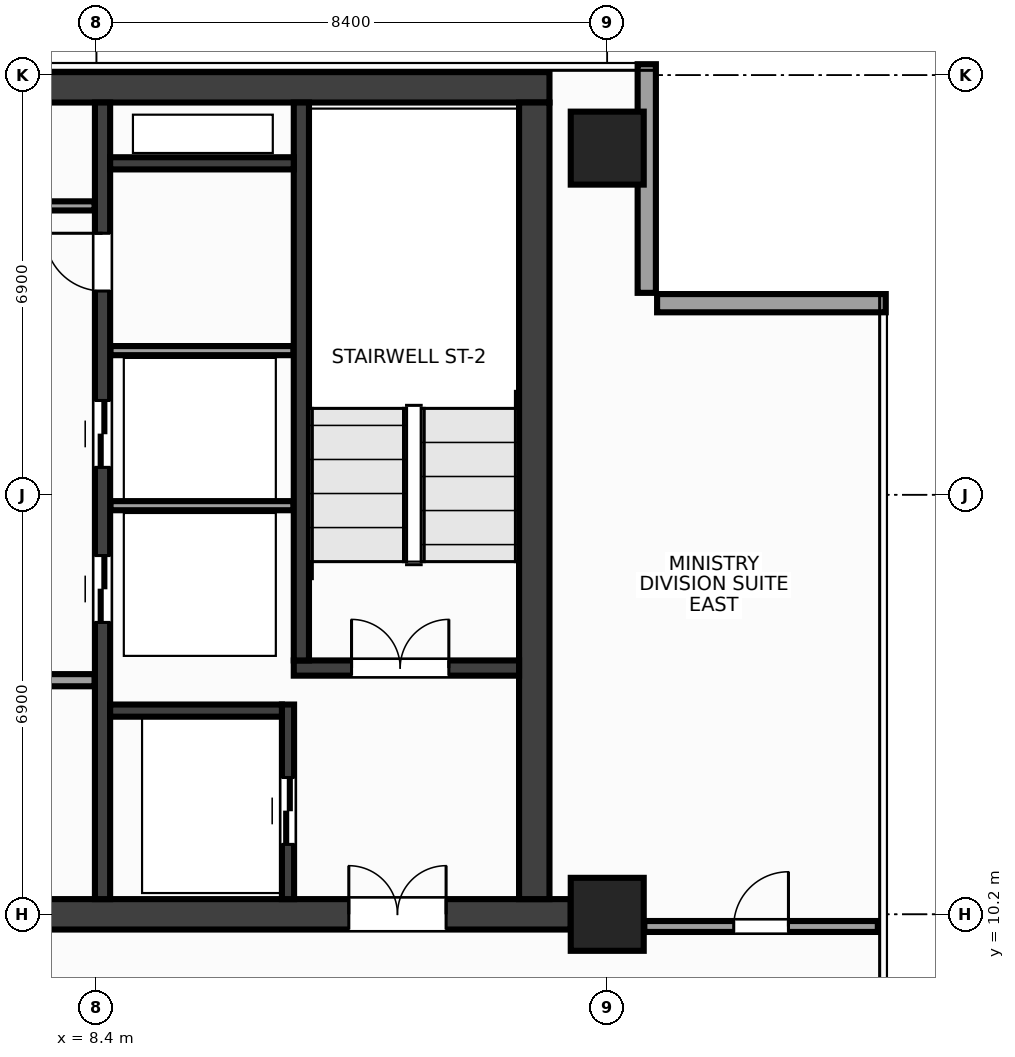
"""IFC4 building model, lengths in metres.
Left out: names, types, materials, properties, quantities, classifications, styles, units other than length and angle.
Written with IfcOpenShell. Run it as: python <this file> out.ifc"""

import sys

from ifc_helpers import new_model, si_unit, direction, frame, frame_2d, origin, origin_2d, place, context, subcontext, project, spatial, rectangle, extrude, source, transform, mapped, element, fill, save


model = new_model("IFC4")
c1 = context("Model", 3, precision=1e-05, world=origin(), true_north=direction((0.0, 1.0)))
c2 = subcontext(c1, "Body", "Model", "MODEL_VIEW")
j1 = project(units=[si_unit("LENGTHUNIT", "METRE"), si_unit("PLANEANGLEUNIT", "RADIAN")], contexts=[c1])
p1 = place(None, origin())
s1 = spatial("IfcSite", under=j1, at=p1, CompositionType="ELEMENT")
p2 = place(p1, origin())
s2 = spatial("IfcBuilding", under=s1, at=p2, CompositionType="ELEMENT")
p3 = place(p2, frame((0.0, 0.0, 290.0)))
s3 = spatial("IfcBuildingStorey", under=s2, at=p3, CompositionType="ELEMENT", Elevation=290.0)
m1 = source(origin(), c2, "Body", "SweptSolid", [
    extrude(rectangle(XDim=31.7, YDim=0.5, at=frame_2d((15.85, 0.0))), origin(), (0.0, 0.0, 1.0), 3.6),
])
p4 = place(p3, frame((-15.85, 23.8, 0.0), z_axis=(0.0, 0.0, 1.0), x_axis=(1.0, 0.0, 0.0)))
e1 = element("IfcWall", 1, at=p4, inside=s3, PredefinedType="SHEAR", context=c2, shape_type="MappedRepresentation", body=[
    mapped(m1, transform((0.0, 0.0, 0.0), x_axis=(1.0, 0.0, 0.0), y_axis=(0.0, 1.0, 0.0), z_axis=(0.0, 0.0, 1.0), scale=1.0)),
])
m2 = source(origin(), c2, "Body", "SweptSolid", [
    extrude(rectangle(XDim=32.4, YDim=0.5, at=frame_2d((16.2, 0.0))), origin(), (0.0, 0.0, 1.0), 3.6),
])
p5 = place(p3, frame((-16.2, 10.2, 0.0), z_axis=(0.0, 0.0, 1.0), x_axis=(1.0, 0.0, 0.0)))
e2 = element("IfcWall", 2, at=p5, inside=s3, PredefinedType="SHEAR", context=c2, shape_type="MappedRepresentation", body=[
    mapped(m2, transform((0.0, 0.0, 0.0), x_axis=(1.0, 0.0, 0.0), y_axis=(0.0, 1.0, 0.0), z_axis=(0.0, 0.0, 1.0), scale=1.0)),
])
p6 = place(p5, frame((2.05, 0.0, 0.0)))
e3 = element("IfcOpeningElement", 3, at=p6, cuts=e2, PredefinedType="OPENING", context=c2, shape_type="SweptSolid", body=[
    extrude(rectangle(XDim=1.6, YDim=2.15, at=frame_2d((0.8, 1.075))), frame((0.0, 0.262, 0.0), z_axis=(0.0, -1.0, 0.0), x_axis=(1.0, 0.0, 0.0)), (0.0, 0.0, 1.0), 0.524),
])
p7 = place(p5, frame((28.75, 0.0, 0.0)))
e4 = element("IfcOpeningElement", 4, at=p7, cuts=e2, PredefinedType="OPENING", context=c2, shape_type="SweptSolid", body=[
    extrude(rectangle(XDim=1.6, YDim=2.15, at=frame_2d((0.8, 1.075))), frame((0.0, 0.262, 0.0), z_axis=(0.0, -1.0, 0.0), x_axis=(1.0, 0.0, 0.0)), (0.0, 0.0, 1.0), 0.524),
])
p8 = place(p5, frame((15.45, 0.0, 0.0)))
e5 = element("IfcOpeningElement", 5, at=p8, cuts=e2, PredefinedType="OPENING", context=c2, shape_type="SweptSolid", body=[
    extrude(rectangle(XDim=1.5, YDim=2.2, at=frame_2d((0.75, 1.1))), frame((0.0, 0.262, 0.0), z_axis=(0.0, -1.0, 0.0), x_axis=(1.0, 0.0, 0.0)), (0.0, 0.0, 1.0), 0.524),
])
m3 = source(origin(), c2, "Body", "SweptSolid", [
    extrude(rectangle(XDim=13.1, YDim=0.5, at=frame_2d((6.55, 0.0))), origin(), (0.0, 0.0, 1.0), 3.6),
])
p9 = place(p3, frame((15.6, 10.45, 0.0), z_axis=(0.0, 0.0, 1.0), x_axis=(0.0, 1.0, 0.0)))
e6 = element("IfcWall", 6, at=p9, inside=s3, PredefinedType="SHEAR", context=c2, shape_type="MappedRepresentation", body=[
    mapped(m3, transform((0.0, 0.0, 0.0), x_axis=(1.0, 0.0, 0.0), y_axis=(0.0, 1.0, 0.0), z_axis=(0.0, 0.0, 1.0), scale=1.0)),
])
m4 = source(origin(), c2, "Body", "SweptSolid", [
    extrude(rectangle(XDim=13.1, YDim=0.25, at=frame_2d((6.55, 0.0))), origin(), (0.0, 0.0, 1.0), 3.6),
])
p10 = place(p3, frame((8.5, 10.45, 0.0), z_axis=(0.0, 0.0, 1.0), x_axis=(0.0, 1.0, 0.0)))
e7 = element("IfcWall", 7, at=p10, inside=s3, PredefinedType="SHEAR", context=c2, shape_type="MappedRepresentation", body=[
    mapped(m4, transform((0.0, 0.0, 0.0), x_axis=(1.0, 0.0, 0.0), y_axis=(0.0, 1.0, 0.0), z_axis=(0.0, 0.0, 1.0), scale=1.0)),
])
p11 = place(p10, frame((4.55, 0.0, 0.0)))
e8 = element("IfcOpeningElement", 8, at=p11, cuts=e7, PredefinedType="OPENING", context=c2, shape_type="SweptSolid", body=[
    extrude(rectangle(XDim=1.1, YDim=2.15, at=frame_2d((0.55, 1.075))), frame((0.0, 0.137, 0.0), z_axis=(0.0, -1.0, 0.0), x_axis=(1.0, 0.0, 0.0)), (0.0, 0.0, 1.0), 0.274),
])
p12 = place(p10, frame((7.1, 0.0, 0.0)))
e9 = element("IfcOpeningElement", 9, at=p12, cuts=e7, PredefinedType="OPENING", context=c2, shape_type="SweptSolid", body=[
    extrude(rectangle(XDim=1.1, YDim=2.15, at=frame_2d((0.55, 1.075))), frame((0.0, 0.137, 0.0), z_axis=(0.0, -1.0, 0.0), x_axis=(1.0, 0.0, 0.0)), (0.0, 0.0, 1.0), 0.274),
])
p13 = place(p10, frame((10.0, 0.0, 0.0)))
e10 = element("IfcOpeningElement", 10, at=p13, cuts=e7, PredefinedType="OPENING", context=c2, shape_type="SweptSolid", body=[
    extrude(rectangle(XDim=0.95, YDim=2.15, at=frame_2d((0.475, 1.075))), frame((0.0, 0.137, 0.0), z_axis=(0.0, -1.0, 0.0), x_axis=(1.0, 0.0, 0.0)), (0.0, 0.0, 1.0), 0.274),
])
m5 = source(origin(), c2, "Body", "SweptSolid", [
    extrude(rectangle(XDim=3.705, YDim=0.25, at=frame_2d((1.853, 0.0))), origin(), (0.0, 0.0, 1.0), 3.6),
])
p14 = place(p3, frame((11.645, 14.25, 0.0), z_axis=(0.0, 0.0, 1.0), x_axis=(1.0, 0.0, 0.0)))
e11 = element("IfcWall", 11, at=p14, inside=s3, PredefinedType="SHEAR", context=c2, shape_type="MappedRepresentation", body=[
    mapped(m5, transform((0.0, 0.0, 0.0), x_axis=(1.0, 0.0, 0.0), y_axis=(0.0, 1.0, 0.0), z_axis=(0.0, 0.0, 1.0), scale=1.0)),
])
p15 = place(p14, frame((0.95, 0.0, 0.0)))
e12 = element("IfcOpeningElement", 12, at=p15, cuts=e11, PredefinedType="OPENING", context=c2, shape_type="SweptSolid", body=[
    extrude(rectangle(XDim=1.6, YDim=2.15, at=frame_2d((0.8, 1.075))), frame((0.0, 0.137, 0.0), z_axis=(0.0, -1.0, 0.0), x_axis=(1.0, 0.0, 0.0)), (0.0, 0.0, 1.0), 0.274),
])
m6 = source(origin(), c2, "Body", "SweptSolid", [
    extrude(rectangle(XDim=9.175, YDim=0.25, at=frame_2d((4.587, 0.0))), origin(), (0.0, 0.0, 1.0), 3.6),
])
p16 = place(p3, frame((11.77, 14.375, 0.0), z_axis=(0.0, 0.0, 1.0), x_axis=(0.0, 1.0, 0.0)))
e13 = element("IfcWall", 13, at=p16, inside=s3, PredefinedType="SHEAR", context=c2, shape_type="MappedRepresentation", body=[
    mapped(m6, transform((0.0, 0.0, 0.0), x_axis=(1.0, 0.0, 0.0), y_axis=(0.0, 1.0, 0.0), z_axis=(0.0, 0.0, 1.0), scale=1.0)),
])
m7 = source(origin(), c2, "Body", "SweptSolid", [
    extrude(rectangle(XDim=3.2, YDim=0.2, at=frame_2d((1.6, 0.0))), origin(), (0.0, 0.0, 1.0), 3.6),
])
p17 = place(p3, frame((11.55, 10.45, 0.0), z_axis=(0.0, 0.0, 1.0), x_axis=(0.0, 1.0, 0.0)))
e14 = element("IfcWall", 14, at=p17, inside=s3, PredefinedType="SHEAR", context=c2, shape_type="MappedRepresentation", body=[
    mapped(m7, transform((0.0, 0.0, 0.0), x_axis=(1.0, 0.0, 0.0), y_axis=(0.0, 1.0, 0.0), z_axis=(0.0, 0.0, 1.0), scale=1.0)),
])
p18 = place(p17, frame((0.9, 0.0, 0.0)))
e15 = element("IfcOpeningElement", 15, at=p18, cuts=e14, PredefinedType="OPENING", context=c2, shape_type="SweptSolid", body=[
    extrude(rectangle(XDim=1.1, YDim=2.15, at=frame_2d((0.55, 1.075))), frame((0.0, 0.112, 0.0), z_axis=(0.0, -1.0, 0.0), x_axis=(1.0, 0.0, 0.0)), (0.0, 0.0, 1.0), 0.224),
])
m8 = source(origin(), c2, "Body", "SweptSolid", [
    extrude(rectangle(XDim=2.825, YDim=0.2, at=frame_2d((1.413, 0.0))), origin(), (0.0, 0.0, 1.0), 3.6),
])
p19 = place(p3, frame((8.625, 13.55, 0.0), z_axis=(0.0, 0.0, 1.0), x_axis=(1.0, 0.0, 0.0)))
e16 = element("IfcWall", 16, at=p19, inside=s3, PredefinedType="SHEAR", context=c2, shape_type="MappedRepresentation", body=[
    mapped(m8, transform((0.0, 0.0, 0.0), x_axis=(1.0, 0.0, 0.0), y_axis=(0.0, 1.0, 0.0), z_axis=(0.0, 0.0, 1.0), scale=1.0)),
])
m9 = source(origin(), c2, "Body", "SweptSolid", [
    extrude(rectangle(XDim=3.02, YDim=0.2, at=frame_2d((1.51, 0.0))), origin(), (0.0, 0.0, 1.0), 3.6),
])
p20 = place(p3, frame((8.625, 22.55, 0.0), z_axis=(0.0, 0.0, 1.0), x_axis=(1.0, 0.0, 0.0)))
e17 = element("IfcWall", 17, at=p20, inside=s3, PredefinedType="SHEAR", context=c2, shape_type="MappedRepresentation", body=[
    mapped(m9, transform((0.0, 0.0, 0.0), x_axis=(1.0, 0.0, 0.0), y_axis=(0.0, 1.0, 0.0), z_axis=(0.0, 0.0, 1.0), scale=1.0)),
])
m10 = source(origin(), c2, "Body", "SweptSolid", [
    extrude(rectangle(XDim=1.2, YDim=1.2, at=origin_2d()), origin(), (0.0, 0.0, 1.0), 3.6),
])
for number, where, z_axis, x_axis in (
    (18, (16.8, 10.2, 0.0), (0.0, 0.0, 1.0), (1.0, 0.0, 0.0)),
    (19, (16.8, 22.8, 0.0), (0.0, 0.0, 1.0), (1.0, 0.0, 0.0)),
):
    element("IfcColumn", number, at=place(p3, frame(where, z_axis=z_axis, x_axis=x_axis)), inside=s3, PredefinedType="COLUMN", context=c2, shape_type="MappedRepresentation", body=[
        mapped(m10, transform((0.0, 0.0, 0.0), x_axis=(1.0, 0.0, 0.0), y_axis=(0.0, 1.0, 0.0), z_axis=(0.0, 0.0, 1.0), scale=1.0)),
    ])
m11 = source(origin(), c2, "Body", "SweptSolid", [
    extrude(rectangle(XDim=3.76, YDim=0.3, at=frame_2d((1.88, 0.0))), origin(), (0.0, 0.0, 1.0), 3.6),
])
p21 = place(p3, frame((21.38, 20.25, 0.0), z_axis=(0.0, 0.0, 1.0), x_axis=(-1.0, 0.0, 0.0)))
e20 = element("IfcWall", 20, at=p21, inside=s3, PredefinedType="STANDARD", context=c2, shape_type="MappedRepresentation", body=[
    mapped(m11, transform((0.0, 0.0, 0.0), x_axis=(1.0, 0.0, 0.0), y_axis=(0.0, 1.0, 0.0), z_axis=(0.0, 0.0, 1.0), scale=1.0)),
])
m12 = source(origin(), c2, "Body", "SweptSolid", [
    extrude(rectangle(XDim=3.76, YDim=0.3, at=frame_2d((1.88, 0.0))), origin(), (0.0, 0.0, 1.0), 3.6),
])
p22 = place(p3, frame((17.45, 20.42, 0.0), z_axis=(0.0, 0.0, 1.0), x_axis=(0.0, 1.0, 0.0)))
e21 = element("IfcWall", 21, at=p22, inside=s3, PredefinedType="STANDARD", context=c2, shape_type="MappedRepresentation", body=[
    mapped(m12, transform((0.0, 0.0, 0.0), x_axis=(1.0, 0.0, 0.0), y_axis=(0.0, 1.0, 0.0), z_axis=(0.0, 0.0, 1.0), scale=1.0)),
])
m13 = source(origin(), c2, "Body", "SweptSolid", [
    extrude(rectangle(XDim=3.01, YDim=0.15, at=frame_2d((1.505, 0.0))), origin(), (0.0, 0.0, 1.0), 3.3),
])
for number, where, z_axis, x_axis in (
    (22, (8.63, 16.92, 0.0), (0.0, 0.0, 1.0), (1.0, 0.0, 0.0)),
    (23, (8.63, 19.47, 0.0), (0.0, 0.0, 1.0), (1.0, 0.0, 0.0)),
):
    element("IfcWall", number, at=place(p3, frame(where, z_axis=z_axis, x_axis=x_axis)), inside=s3, PredefinedType="PARTITIONING", context=c2, shape_type="MappedRepresentation", body=[
        mapped(m13, transform((0.0, 0.0, 0.0), x_axis=(1.0, 0.0, 0.0), y_axis=(0.0, 1.0, 0.0), z_axis=(0.0, 0.0, 1.0), scale=1.0)),
    ])
m14 = source(origin(), c2, "Body", "SweptSolid", [
    extrude(rectangle(XDim=7.07, YDim=0.2, at=frame_2d((3.535, 0.0))), origin(), (0.0, 0.0, 1.0), 3.3),
])
p23 = place(p3, frame((1.3, 14.05, 0.0), z_axis=(0.0, 0.0, 1.0), x_axis=(1.0, 0.0, 0.0)))
e24 = element("IfcWall", 24, at=p23, inside=s3, PredefinedType="PARTITIONING", context=c2, shape_type="MappedRepresentation", body=[
    mapped(m14, transform((0.0, 0.0, 0.0), x_axis=(1.0, 0.0, 0.0), y_axis=(0.0, 1.0, 0.0), z_axis=(0.0, 0.0, 1.0), scale=1.0)),
])
p24 = place(p23, frame((2.8, 0.0, 0.0)))
e25 = element("IfcOpeningElement", 25, at=p24, cuts=e24, PredefinedType="OPENING", context=c2, shape_type="SweptSolid", body=[
    extrude(rectangle(XDim=0.98, YDim=2.15, at=frame_2d((0.49, 1.075))), frame((0.0, 0.112, 0.0), z_axis=(0.0, -1.0, 0.0), x_axis=(1.0, 0.0, 0.0)), (0.0, 0.0, 1.0), 0.224),
])
m15 = source(origin(), c2, "Body", "SweptSolid", [
    extrude(rectangle(XDim=2.07, YDim=0.15, at=frame_2d((1.035, 0.0))), origin(), (0.0, 0.0, 1.0), 3.3),
])
p25 = place(p3, frame((6.3, 21.85, 0.0), z_axis=(0.0, 0.0, 1.0), x_axis=(1.0, 0.0, 0.0)))
e26 = element("IfcWall", 26, at=p25, inside=s3, PredefinedType="PARTITIONING", context=c2, shape_type="MappedRepresentation", body=[
    mapped(m15, transform((0.0, 0.0, 0.0), x_axis=(1.0, 0.0, 0.0), y_axis=(0.0, 1.0, 0.0), z_axis=(0.0, 0.0, 1.0), scale=1.0)),
])
m16 = source(origin(), c2, "Body", "SweptSolid", [
    extrude(rectangle(XDim=3.84, YDim=0.18, at=frame_2d((1.92, 0.0))), origin(), (0.0, 0.0, 1.0), 2.735),
])
p26 = place(p3, frame((17.41, 10.0, 0.0), z_axis=(0.0, 0.0, 1.0), x_axis=(1.0, 0.0, 0.0)))
e27 = element("IfcWall", 27, at=p26, inside=s3, PredefinedType="PARTITIONING", context=c2, shape_type="MappedRepresentation", body=[
    mapped(m16, transform((0.0, 0.0, 0.0), x_axis=(1.0, 0.0, 0.0), y_axis=(0.0, 1.0, 0.0), z_axis=(0.0, 0.0, 1.0), scale=1.0)),
])
p27 = place(p26, frame((1.47, 0.0, 0.0)))
e28 = element("IfcOpeningElement", 28, at=p27, cuts=e27, PredefinedType="OPENING", context=c2, shape_type="SweptSolid", body=[
    extrude(rectangle(XDim=0.9, YDim=2.15, at=frame_2d((0.45, 1.075))), frame((0.0, 0.102, 0.0), z_axis=(0.0, -1.0, 0.0), x_axis=(1.0, 0.0, 0.0)), (0.0, 0.0, 1.0), 0.204),
])
m17 = source(origin(), c2, "Body", "SweptSolid", [
    extrude(rectangle(XDim=1.6, YDim=2.15, at=frame_2d((0.8, 1.075))), frame((0.0, 0.025, 0.0), z_axis=(0.0, -1.0, 0.0), x_axis=(1.0, 0.0, 0.0)), (0.0, 0.0, 1.0), 0.05),
])
p28 = place(p15, origin())
e29 = element("IfcDoor", 29, at=p28, inside=s3, OperationType="DOUBLE_DOOR_SINGLE_SWING", PredefinedType="DOOR", context=c2, shape_type="MappedRepresentation", body=[
    mapped(m17, transform((0.0, 0.0, 0.0), x_axis=(1.0, 0.0, 0.0), y_axis=(0.0, 1.0, 0.0), z_axis=(0.0, 0.0, 1.0), scale=1.0)),
])
fill(e12, e29)
p29 = place(p7, origin())
e30 = element("IfcDoor", 30, at=p29, inside=s3, OperationType="DOUBLE_DOOR_SINGLE_SWING", PredefinedType="DOOR", context=c2, shape_type="MappedRepresentation", body=[
    mapped(m17, transform((0.0, 0.0, 0.0), x_axis=(1.0, 0.0, 0.0), y_axis=(0.0, 1.0, 0.0), z_axis=(0.0, 0.0, 1.0), scale=1.0)),
])
fill(e4, e30)
m18 = source(origin(), c2, "Body", "SweptSolid", [
    extrude(rectangle(XDim=1.1, YDim=2.15, at=frame_2d((0.55, 1.075))), frame((0.0, 0.025, 0.0), z_axis=(0.0, -1.0, 0.0), x_axis=(1.0, 0.0, 0.0)), (0.0, 0.0, 1.0), 0.05),
])
p30 = place(p18, origin())
e31 = element("IfcDoor", 31, at=p30, inside=s3, OperationType="DOUBLE_DOOR_SLIDING", PredefinedType="DOOR", context=c2, shape_type="MappedRepresentation", body=[
    mapped(m18, transform((0.0, 0.0, 0.0), x_axis=(1.0, 0.0, 0.0), y_axis=(0.0, 1.0, 0.0), z_axis=(0.0, 0.0, 1.0), scale=1.0)),
])
fill(e15, e31)
p31 = place(p11, origin())
e32 = element("IfcDoor", 32, at=p31, inside=s3, OperationType="DOUBLE_DOOR_SLIDING", PredefinedType="DOOR", context=c2, shape_type="MappedRepresentation", body=[
    mapped(m18, transform((0.0, 0.0, 0.0), x_axis=(1.0, 0.0, 0.0), y_axis=(0.0, 1.0, 0.0), z_axis=(0.0, 0.0, 1.0), scale=1.0)),
])
fill(e8, e32)
p32 = place(p12, origin())
e33 = element("IfcDoor", 33, at=p32, inside=s3, OperationType="DOUBLE_DOOR_SLIDING", PredefinedType="DOOR", context=c2, shape_type="MappedRepresentation", body=[
    mapped(m18, transform((0.0, 0.0, 0.0), x_axis=(1.0, 0.0, 0.0), y_axis=(0.0, 1.0, 0.0), z_axis=(0.0, 0.0, 1.0), scale=1.0)),
])
fill(e9, e33)
m19 = source(origin(), c2, "Body", "SweptSolid", [
    extrude(rectangle(XDim=0.95, YDim=2.15, at=frame_2d((0.475, 1.075))), frame((0.0, 0.025, 0.0), z_axis=(0.0, -1.0, 0.0), x_axis=(1.0, 0.0, 0.0)), (0.0, 0.0, 1.0), 0.05),
])
p33 = place(p13, origin())
e34 = element("IfcDoor", 34, at=p33, inside=s3, OperationType="SINGLE_SWING_RIGHT", PredefinedType="DOOR", context=c2, shape_type="MappedRepresentation", body=[
    mapped(m19, transform((0.0, 0.0, 0.0), x_axis=(1.0, 0.0, 0.0), y_axis=(0.0, 1.0, 0.0), z_axis=(0.0, 0.0, 1.0), scale=1.0)),
])
fill(e10, e34)
m20 = source(origin(), c2, "Body", "SweptSolid", [
    extrude(rectangle(XDim=0.9, YDim=2.15, at=frame_2d((0.45, 1.075))), frame((0.0, 0.025, 0.0), z_axis=(0.0, -1.0, 0.0), x_axis=(1.0, 0.0, 0.0)), (0.0, 0.0, 1.0), 0.05),
])
p34 = place(p27, origin())
e35 = element("IfcDoor", 35, at=p34, inside=s3, OperationType="SINGLE_SWING_RIGHT", PredefinedType="DOOR", context=c2, shape_type="MappedRepresentation", body=[
    mapped(m20, transform((0.0, 0.0, 0.0), x_axis=(1.0, 0.0, 0.0), y_axis=(0.0, 1.0, 0.0), z_axis=(0.0, 0.0, 1.0), scale=1.0)),
])
fill(e28, e35)
save(model, sys.argv[1])
